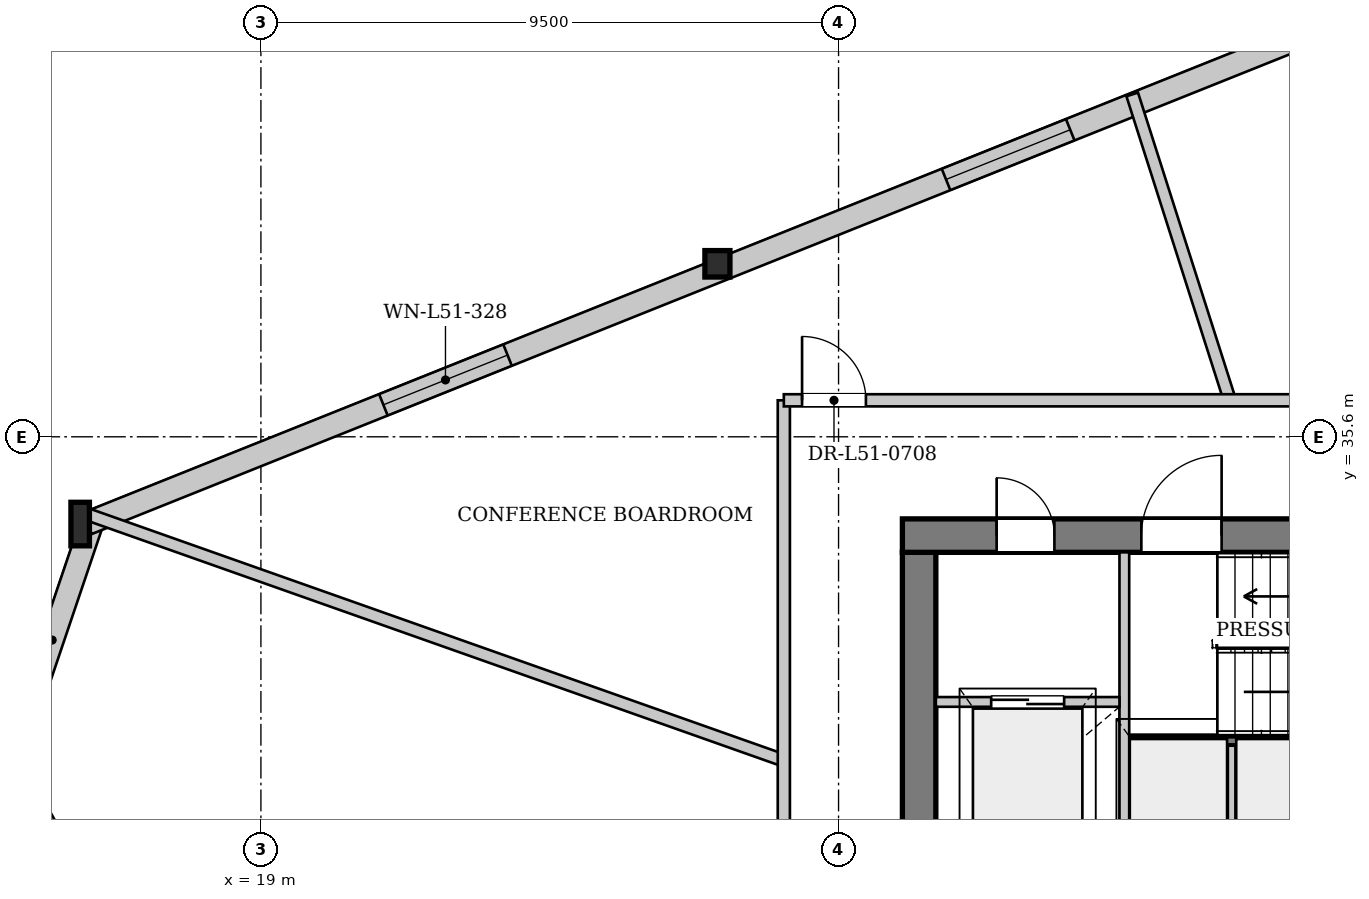
"""IFC4 building model, lengths in metres.
Left out: names, types, materials, properties, quantities, classifications, styles, units other than length and angle.
Written with IfcOpenShell. Run it as: python <this file> out.ifc"""

import sys

from ifc_helpers import new_model, si_unit, direction, frame, frame_2d, origin, origin_2d, place, context, subcontext, project, spatial, rectangle, i_section, extrude, source, transform, mapped, element, fill, save


model = new_model("IFC4")
c1 = context("Model", 3, precision=1e-05, world=origin(), true_north=direction((0.0, 1.0)))
c2 = subcontext(c1, "Body", "Model", "MODEL_VIEW")
j1 = project(units=[si_unit("LENGTHUNIT", "METRE"), si_unit("PLANEANGLEUNIT", "RADIAN")], contexts=[c1])
p1 = place(None, origin())
s1 = spatial("IfcSite", under=j1, at=p1, CompositionType="ELEMENT")
p2 = place(p1, origin())
s2 = spatial("IfcBuilding", under=s1, at=p2, CompositionType="ELEMENT")
p3 = place(p2, frame((0.0, 0.0, 192.75)))
s3 = spatial("IfcBuildingStorey", under=s2, at=p3, CompositionType="ELEMENT", Elevation=192.75)
m1 = source(origin(), c2, "Body", "SweptSolid", [
    extrude(i_section(OverallWidth=0.412, OverallDepth=0.435, WebThickness=0.031, FlangeThickness=0.05, at=origin_2d()), origin(), (0.0, 0.0, 1.0), 3.397),
])
p4 = place(p3, frame((26.591, 38.564, 0.0), z_axis=(-0.049151350366, -0.070205949281, 0.996320866711), x_axis=(0.819192527025, -0.573518616669, 0.0)))
e1 = element("IfcColumn", 1, at=p4, inside=s3, PredefinedType="COLUMN", context=c2, shape_type="MappedRepresentation", body=[
    mapped(m1, transform((0.0, 0.0, 0.0), x_axis=(1.0, 0.0, 0.0), y_axis=(0.0, 1.0, 0.0), z_axis=(0.0, 0.0, 1.0), scale=1.0)),
])
m2 = source(origin(), c2, "Body", "SweptSolid", [
    extrude(i_section(OverallWidth=0.304, OverallDepth=0.716, WebThickness=0.021, FlangeThickness=0.04, at=origin_2d()), origin(), (0.0, 0.0, 1.0), 3.407),
])
p5 = place(p3, frame((16.075, 34.353, 0.0), z_axis=(-0.027945986279, -0.110207504864, 0.993515640402), x_axis=(0.969321399482, -0.245796713783, 0.0)))
e2 = element("IfcColumn", 2, at=p5, inside=s3, PredefinedType="COLUMN", context=c2, shape_type="MappedRepresentation", body=[
    mapped(m2, transform((0.0, 0.0, 0.0), x_axis=(1.0, 0.0, 0.0), y_axis=(0.0, 1.0, 0.0), z_axis=(0.0, 0.0, 1.0), scale=1.0)),
])
p6 = place(p3, frame((23.432, 14.814, 0.0), z_axis=(0.0, 0.0, 1.0), x_axis=(-0.483768949269, 0.87519575166, 0.0)))
e3 = element("IfcWall", 3, at=p6, inside=s3, PredefinedType="SOLIDWALL", context=c2, shape_type="SweptSolid", body=[
    extrude(rectangle(XDim=17.764, YDim=0.32, at=frame_2d((8.882, 0.0))), origin(), (0.0, 0.0, 1.0), 2.722),
])
p7 = place(p6, frame((4.935, 0.0, 0.0)))
e4 = element("IfcOpeningElement", 4, at=p7, cuts=e3, PredefinedType="OPENING", context=c2, shape_type="SweptSolid", body=[
    extrude(rectangle(XDim=1.5, YDim=2.3, at=frame_2d((0.75, 1.15))), frame((0.0, 0.17, 0.0), z_axis=(0.0, -1.0, 0.0), x_axis=(1.0, 0.0, 0.0)), (0.0, 0.0, 1.0), 0.34),
])
p8 = place(p6, frame((11.845, 0.0, 0.252)))
e5 = element("IfcOpeningElement", 5, at=p8, cuts=e3, PredefinedType="OPENING", context=c2, shape_type="SweptSolid", body=[
    extrude(rectangle(XDim=2.6, YDim=2.35, at=frame_2d((1.3, 1.175))), frame((0.0, 0.17, 0.0), z_axis=(0.0, -1.0, 0.0), x_axis=(1.0, 0.0, 0.0)), (0.0, 0.0, 1.0), 0.34),
])
p9 = place(p3, frame((14.878, 30.223, 0.0), z_axis=(0.0, 0.0, 1.0), x_axis=(0.320555378546, 0.947229776393, 0.0)))
e6 = element("IfcWall", 6, at=p9, inside=s3, PredefinedType="SOLIDWALL", context=c2, shape_type="SweptSolid", body=[
    extrude(rectangle(XDim=4.295, YDim=0.38, at=frame_2d((2.148, 0.0))), origin(), (0.0, 0.0, 1.0), 2.722),
])
p10 = place(p3, frame((16.146, 34.177, 0.0), z_axis=(0.0, 0.0, 1.0), x_axis=(0.928328726299, 0.371760374339, 0.0)))
e7 = element("IfcWall", 7, at=p10, inside=s3, PredefinedType="SOLIDWALL", context=c2, shape_type="SweptSolid", body=[
    extrude(rectangle(XDim=22.656, YDim=0.38, at=frame_2d((11.328, 0.0))), origin(), (0.0, 0.0, 1.0), 2.722),
])
p11 = place(p10, frame((5.244, 0.0, 0.352)))
e8 = element("IfcOpeningElement", 8, at=p11, cuts=e7, PredefinedType="OPENING", context=c2, shape_type="SweptSolid", body=[
    extrude(rectangle(XDim=2.2, YDim=2.25, at=frame_2d((1.1, 1.125))), frame((0.0, 0.2, 0.0), z_axis=(0.0, -1.0, 0.0), x_axis=(1.0, 0.0, 0.0)), (0.0, 0.0, 1.0), 0.4),
])
p12 = place(p10, frame((15.212, 0.0, 0.352)))
e9 = element("IfcOpeningElement", 9, at=p12, cuts=e7, PredefinedType="OPENING", context=c2, shape_type="SweptSolid", body=[
    extrude(rectangle(XDim=2.2, YDim=2.25, at=frame_2d((1.1, 1.125))), frame((0.0, 0.2, 0.0), z_axis=(0.0, -1.0, 0.0), x_axis=(1.0, 0.0, 0.0)), (0.0, 0.0, 1.0), 0.4),
])
p13 = place(p3, frame((29.825, 19.5, 0.0), z_axis=(0.0, 0.0, 1.0), x_axis=(0.0, 1.0, 0.0)))
e10 = element("IfcWall", 10, at=p13, inside=s3, PredefinedType="SHEAR", context=c2, shape_type="SweptSolid", body=[
    extrude(rectangle(XDim=14.2, YDim=0.55, at=frame_2d((7.1, 0.0))), origin(), (0.0, 0.0, 1.0), 3.33),
])
p14 = place(p13, frame((7.42, 0.0, 0.0)))
e11 = element("IfcOpeningElement", 11, at=p14, cuts=e10, PredefinedType="OPENING", context=c2, shape_type="SweptSolid", body=[
    extrude(rectangle(XDim=1.6, YDim=2.2, at=frame_2d((0.8, 1.1))), frame((0.0, 0.285, 0.0), z_axis=(0.0, -1.0, 0.0), x_axis=(1.0, 0.0, 0.0)), (0.0, 0.0, 1.0), 0.57),
])
p15 = place(p3, frame((29.55, 33.975, 0.0), z_axis=(0.0, 0.0, 1.0), x_axis=(1.0, 0.0, 0.0)))
e12 = element("IfcWall", 12, at=p15, inside=s3, PredefinedType="SHEAR", context=c2, shape_type="SweptSolid", body=[
    extrude(rectangle(XDim=16.9, YDim=0.55, at=frame_2d((8.45, 0.0))), origin(), (0.0, 0.0, 1.0), 3.33),
])
p16 = place(p15, frame((1.55, 0.0, 0.0)))
e13 = element("IfcOpeningElement", 13, at=p16, cuts=e12, PredefinedType="OPENING", context=c2, shape_type="SweptSolid", body=[
    extrude(rectangle(XDim=0.95, YDim=2.1, at=frame_2d((0.475, 1.05))), frame((0.0, 0.285, 0.0), z_axis=(0.0, -1.0, 0.0), x_axis=(1.0, 0.0, 0.0)), (0.0, 0.0, 1.0), 0.57),
])
p17 = place(p15, frame((3.93, 0.0, 0.0)))
e14 = element("IfcOpeningElement", 14, at=p17, cuts=e12, PredefinedType="OPENING", context=c2, shape_type="SweptSolid", body=[
    extrude(rectangle(XDim=1.32, YDim=2.2, at=frame_2d((0.66, 1.1))), frame((0.0, 0.285, 0.0), z_axis=(0.0, -1.0, 0.0), x_axis=(1.0, 0.0, 0.0)), (0.0, 0.0, 1.0), 0.57),
])
p18 = place(p3, frame((33.28, 30.6, 0.0), z_axis=(0.0, 0.0, 1.0), x_axis=(1.0, 0.0, 0.0)))
e15 = element("IfcWall", 15, at=p18, inside=s3, PredefinedType="PARTITIONING", context=c2, shape_type="SweptSolid", body=[
    extrude(rectangle(XDim=7.3, YDim=0.16, at=frame_2d((3.65, 0.0))), origin(), (0.0, 0.0, 1.0), 3.33),
])
p19 = place(p3, frame((33.2, 28.44, 0.0), z_axis=(0.0, 0.0, 1.0), x_axis=(0.0, 1.0, 0.0)))
e16 = element("IfcWall", 16, at=p19, inside=s3, PredefinedType="PARTITIONING", context=c2, shape_type="SweptSolid", body=[
    extrude(rectangle(XDim=5.26, YDim=0.16, at=frame_2d((2.63, 0.0))), origin(), (0.0, 0.0, 1.0), 3.33),
])
p20 = place(p3, frame((30.1, 31.24, 0.0), z_axis=(0.0, 0.0, 1.0), x_axis=(1.0, 0.0, 0.0)))
e17 = element("IfcWall", 17, at=p20, inside=s3, PredefinedType="PARTITIONING", context=c2, shape_type="SweptSolid", body=[
    extrude(rectangle(XDim=3.02, YDim=0.16, at=frame_2d((1.51, 0.0))), origin(), (0.0, 0.0, 1.0), 3.33),
])
p21 = place(p20, frame((0.91, 0.0, 0.0)))
e18 = element("IfcOpeningElement", 18, at=p21, cuts=e17, PredefinedType="OPENING", context=c2, shape_type="SweptSolid", body=[
    extrude(rectangle(XDim=1.2, YDim=2.2, at=frame_2d((0.6, 1.1))), frame((0.0, 0.09, 0.0), z_axis=(0.0, -1.0, 0.0), x_axis=(1.0, 0.0, 0.0)), (0.0, 0.0, 1.0), 0.18),
])
p22 = place(p3, frame((34.965, 28.6, 0.0), z_axis=(0.0, 0.0, 1.0), x_axis=(0.0, 1.0, 0.0)))
e19 = element("IfcWall", 19, at=p22, inside=s3, PredefinedType="PARTITIONING", context=c2, shape_type="SweptSolid", body=[
    extrude(rectangle(XDim=1.92, YDim=0.125, at=frame_2d((0.96, 0.0))), origin(), (0.0, 0.0, 1.0), 3.33),
])
p23 = place(p3, frame((34.935, 36.2, 0.0), z_axis=(0.0, 0.0, 1.0), x_axis=(-0.304092848706, 0.952642398472, 0.0)))
e20 = element("IfcWall", 20, at=p23, inside=s3, PredefinedType="PARTITIONING", context=c2, shape_type="SweptSolid", body=[
    extrude(rectangle(XDim=5.28, YDim=0.2, at=frame_2d((2.64, 0.0))), origin(), (0.0, 0.0, 1.0), 3.33),
])
p24 = place(p3, frame((27.6, 30.277, 0.0), z_axis=(0.0, 0.0, 1.0), x_axis=(-0.942818521108, 0.333306519972, 0.0)))
e21 = element("IfcWall", 21, at=p24, inside=s3, PredefinedType="PARTITIONING", context=c2, shape_type="SweptSolid", body=[
    extrude(rectangle(XDim=12.181, YDim=0.2, at=frame_2d((6.091, 0.0))), origin(), (0.0, 0.0, 1.0), 2.925),
])
p25 = place(p3, frame((27.6, 17.0, 0.0), z_axis=(0.0, 0.0, 1.0), x_axis=(0.0, 1.0, 0.0)))
e22 = element("IfcWall", 22, at=p25, inside=s3, PredefinedType="PARTITIONING", context=c2, shape_type="SweptSolid", body=[
    extrude(rectangle(XDim=19.2, YDim=0.2, at=frame_2d((9.6, 0.0))), origin(), (0.0, 0.0, 1.0), 3.33),
])
p26 = place(p25, frame((7.475, 0.0, 0.0)))
e23 = element("IfcOpeningElement", 23, at=p26, cuts=e22, PredefinedType="OPENING", context=c2, shape_type="SweptSolid", body=[
    extrude(rectangle(XDim=1.05, YDim=2.2, at=frame_2d((0.525, 1.1))), frame((0.0, 0.11, 0.0), z_axis=(0.0, -1.0, 0.0), x_axis=(1.0, 0.0, 0.0)), (0.0, 0.0, 1.0), 0.22),
])
p27 = place(p3, frame((27.6, 36.2, 0.0), z_axis=(0.0, 0.0, 1.0), x_axis=(1.0, 0.0, 0.0)))
e24 = element("IfcWall", 24, at=p27, inside=s3, PredefinedType="PARTITIONING", context=c2, shape_type="SweptSolid", body=[
    extrude(rectangle(XDim=13.4, YDim=0.2, at=frame_2d((6.7, 0.0))), origin(), (0.0, 0.0, 1.0), 3.33),
])
p28 = place(p27, frame((12.05, 0.0, 0.0)))
e25 = element("IfcOpeningElement", 25, at=p28, cuts=e24, PredefinedType="OPENING", context=c2, shape_type="SweptSolid", body=[
    extrude(rectangle(XDim=1.05, YDim=2.2, at=frame_2d((0.525, 1.1))), frame((0.0, 0.11, 0.0), z_axis=(0.0, -1.0, 0.0), x_axis=(1.0, 0.0, 0.0)), (0.0, 0.0, 1.0), 0.22),
])
p29 = place(p27, frame((0.3, 0.0, 0.0)))
e26 = element("IfcOpeningElement", 26, at=p29, cuts=e24, PredefinedType="OPENING", context=c2, shape_type="SweptSolid", body=[
    extrude(rectangle(XDim=1.05, YDim=2.2, at=frame_2d((0.525, 1.1))), frame((0.0, 0.11, 0.0), z_axis=(0.0, -1.0, 0.0), x_axis=(1.0, 0.0, 0.0)), (0.0, 0.0, 1.0), 0.22),
])
m3 = source(origin(), c2, "Body", "SweptSolid", [
    extrude(rectangle(XDim=2.2, YDim=2.25, at=frame_2d((1.1, 1.125))), frame((0.0, 0.03, 0.0), z_axis=(0.0, -1.0, 0.0), x_axis=(1.0, 0.0, 0.0)), (0.0, 0.0, 1.0), 0.06),
])
p30 = place(p11, origin())
e27 = element("IfcWindow", 27, at=p30, inside=s3, PartitioningType="SINGLE_PANEL", PredefinedType="WINDOW", context=c2, shape_type="MappedRepresentation", body=[
    mapped(m3, transform((0.0, 0.0, 0.0), x_axis=(1.0, 0.0, 0.0), y_axis=(0.0, 1.0, 0.0), z_axis=(0.0, 0.0, 1.0), scale=1.0)),
])
fill(e8, e27)
p31 = place(p12, origin())
e28 = element("IfcWindow", 28, at=p31, inside=s3, PartitioningType="SINGLE_PANEL", PredefinedType="WINDOW", context=c2, shape_type="MappedRepresentation", body=[
    mapped(m3, transform((0.0, 0.0, 0.0), x_axis=(1.0, 0.0, 0.0), y_axis=(0.0, 1.0, 0.0), z_axis=(0.0, 0.0, 1.0), scale=1.0)),
])
fill(e9, e28)
m4 = source(origin(), c2, "Body", "SweptSolid", [
    extrude(rectangle(XDim=0.95, YDim=2.1, at=frame_2d((0.475, 1.05))), frame((0.0, 0.025, 0.0), z_axis=(0.0, -1.0, 0.0), x_axis=(1.0, 0.0, 0.0)), (0.0, 0.0, 1.0), 0.05),
])
p32 = place(p16, origin())
e29 = element("IfcDoor", 29, at=p32, inside=s3, OperationType="SINGLE_SWING_LEFT", PredefinedType="DOOR", context=c2, shape_type="MappedRepresentation", body=[
    mapped(m4, transform((0.0, 0.0, 0.0), x_axis=(1.0, 0.0, 0.0), y_axis=(0.0, 1.0, 0.0), z_axis=(0.0, 0.0, 1.0), scale=1.0)),
])
fill(e13, e29)
m5 = source(origin(), c2, "Body", "SweptSolid", [
    extrude(rectangle(XDim=1.32, YDim=2.2, at=frame_2d((0.66, 1.1))), frame((0.0, 0.025, 0.0), z_axis=(0.0, -1.0, 0.0), x_axis=(1.0, 0.0, 0.0)), (0.0, 0.0, 1.0), 0.05),
])
p33 = place(p17, origin())
e30 = element("IfcDoor", 30, at=p33, inside=s3, OperationType="SINGLE_SWING_RIGHT", PredefinedType="DOOR", context=c2, shape_type="MappedRepresentation", body=[
    mapped(m5, transform((0.0, 0.0, 0.0), x_axis=(1.0, 0.0, 0.0), y_axis=(0.0, 1.0, 0.0), z_axis=(0.0, 0.0, 1.0), scale=1.0)),
])
fill(e14, e30)
m6 = source(origin(), c2, "Body", "SweptSolid", [
    extrude(rectangle(XDim=1.2, YDim=2.2, at=frame_2d((0.6, 1.1))), frame((0.0, 0.025, 0.0), z_axis=(0.0, -1.0, 0.0), x_axis=(1.0, 0.0, 0.0)), (0.0, 0.0, 1.0), 0.05),
])
p34 = place(p21, origin())
e31 = element("IfcDoor", 31, at=p34, inside=s3, OperationType="DOUBLE_DOOR_SLIDING", PredefinedType="DOOR", context=c2, shape_type="MappedRepresentation", body=[
    mapped(m6, transform((0.0, 0.0, 0.0), x_axis=(1.0, 0.0, 0.0), y_axis=(0.0, 1.0, 0.0), z_axis=(0.0, 0.0, 1.0), scale=1.0)),
])
fill(e18, e31)
m7 = source(origin(), c2, "Body", "SweptSolid", [
    extrude(rectangle(XDim=1.05, YDim=2.2, at=frame_2d((0.525, 1.1))), frame((0.0, 0.025, 0.0), z_axis=(0.0, -1.0, 0.0), x_axis=(1.0, 0.0, 0.0)), (0.0, 0.0, 1.0), 0.05),
])
p35 = place(p29, origin())
e32 = element("IfcDoor", 32, at=p35, inside=s3, OperationType="SINGLE_SWING_LEFT", PredefinedType="DOOR", context=c2, shape_type="MappedRepresentation", body=[
    mapped(m7, transform((0.0, 0.0, 0.0), x_axis=(1.0, 0.0, 0.0), y_axis=(0.0, 1.0, 0.0), z_axis=(0.0, 0.0, 1.0), scale=1.0)),
])
fill(e26, e32)
save(model, sys.argv[1])
